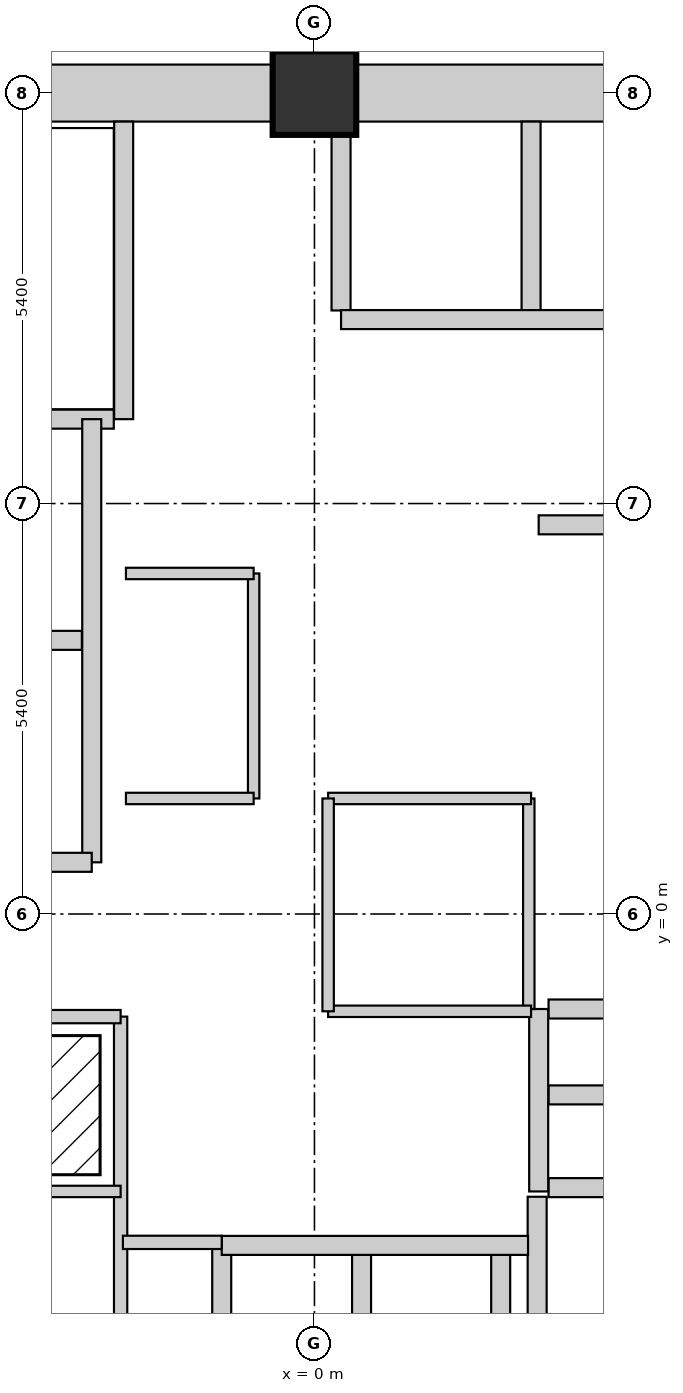
"""IFC4 building model, lengths in metres.
Left out: names, types, materials, properties, quantities, classifications, styles, units other than length and angle.
Written with IfcOpenShell. Run it as: python <this file> out.ifc"""

import sys

from ifc_helpers import new_model, si_unit, direction, frame, frame_2d, origin, origin_2d, place, context, subcontext, project, spatial, rectangle, extrude, element, fill, save


model = new_model("IFC4")
c1 = context("Model", 3, precision=1e-05, world=origin(), true_north=direction((0.0, 1.0)))
c2 = subcontext(c1, "Body", "Model", "MODEL_VIEW")
j1 = project(units=[si_unit("LENGTHUNIT", "METRE"), si_unit("PLANEANGLEUNIT", "RADIAN")], contexts=[c1])
p1 = place(None, origin())
s1 = spatial("IfcSite", under=j1, at=p1, CompositionType="ELEMENT")
p2 = place(p1, origin())
s2 = spatial("IfcBuilding", under=s1, at=p2, CompositionType="ELEMENT")
p3 = place(p2, frame((0.0, 0.0, 83.25)))
s3 = spatial("IfcBuildingStorey", under=s2, at=p3, CompositionType="ELEMENT", Elevation=83.25)
p4 = place(p3, frame((0.0, 10.8, 0.0), z_axis=(0.0, 0.0, 1.0), x_axis=(1.0, 0.0, 0.0)))
e1 = element("IfcColumn", 1, at=p4, inside=s3, PredefinedType="COLUMN", context=c2, shape_type="SweptSolid", body=[
    extrude(rectangle(XDim=1.1, YDim=1.1, at=origin_2d()), origin(), (0.0, 0.0, 1.0), 3.75),
])
p5 = place(p3, frame((-4.84, 10.8, 0.0), z_axis=(0.0, 0.0, 1.0), x_axis=(1.0, 0.0, 0.0)))
e2 = element("IfcWall", 2, at=p5, inside=s3, PredefinedType="SHEAR", context=c2, shape_type="SweptSolid", body=[
    extrude(rectangle(XDim=4.28, YDim=0.75, at=frame_2d((2.14, 0.0))), origin(), (0.0, 0.0, 1.0), 3.75),
])
p6 = place(p5, frame((2.93, 0.0, 0.0)))
e3 = element("IfcOpeningElement", 3, at=p6, cuts=e2, PredefinedType="OPENING", context=c2, shape_type="SweptSolid", body=[
    extrude(rectangle(XDim=1.1, YDim=2.1, at=frame_2d((0.55, 1.05))), frame((0.0, 0.385, 0.0), z_axis=(0.0, -1.0, 0.0), x_axis=(1.0, 0.0, 0.0)), (0.0, 0.0, 1.0), 0.77),
])
p7 = place(p3, frame((0.56, 10.8, 0.0), z_axis=(0.0, 0.0, 1.0), x_axis=(1.0, 0.0, 0.0)))
e4 = element("IfcWall", 4, at=p7, inside=s3, PredefinedType="SHEAR", context=c2, shape_type="SweptSolid", body=[
    extrude(rectangle(XDim=4.28, YDim=0.75, at=frame_2d((2.14, 0.0))), origin(), (0.0, 0.0, 1.0), 3.75),
])
p8 = place(p3, frame((2.93, -6.51, 0.0), z_axis=(0.0, 0.0, 1.0), x_axis=(0.0, 1.0, 0.0)))
e5 = element("IfcWall", 5, at=p8, inside=s3, PredefinedType="SHEAR", context=c2, shape_type="SweptSolid", body=[
    extrude(rectangle(XDim=2.79, YDim=0.25, at=frame_2d((1.395, 0.0))), origin(), (0.0, 0.0, 1.0), 3.75),
])
p9 = place(p3, frame((3.08, -3.6, 0.0), z_axis=(0.0, 0.0, 1.0), x_axis=(1.0, 0.0, 0.0)))
e6 = element("IfcWall", 6, at=p9, inside=s3, PredefinedType="SHEAR", context=c2, shape_type="SweptSolid", body=[
    extrude(rectangle(XDim=2.37, YDim=0.25, at=frame_2d((1.185, 0.0))), origin(), (0.0, 0.0, 1.0), 3.75),
])
for number, where, z_axis, x_axis in (
    (7, (0.62, -6.34, 0.0), (0.0, 0.0, 1.0), (0.0, 1.0, 0.0)),
    (8, (2.45, -6.34, 0.0), (0.0, 0.0, 1.0), (0.0, 1.0, 0.0)),
):
    element("IfcWall", number, at=place(p3, frame(where, z_axis=z_axis, x_axis=x_axis)), inside=s3, PredefinedType="SHEAR", context=c2, shape_type="SweptSolid", body=[
        extrude(rectangle(XDim=1.88, YDim=0.25, at=frame_2d((0.94, 0.0))), origin(), (0.0, 0.0, 1.0), 3.75),
    ])
p10 = place(p3, frame((-1.22, -6.44, 0.0), z_axis=(0.0, 0.0, 1.0), x_axis=(0.0, 1.0, 0.0)))
e9 = element("IfcWall", 9, at=p10, inside=s3, PredefinedType="SHEAR", context=c2, shape_type="SweptSolid", body=[
    extrude(rectangle(XDim=2.08, YDim=0.25, at=frame_2d((1.04, 0.0))), origin(), (0.0, 0.0, 1.0), 3.75),
])
p11 = place(p3, frame((-1.22, -4.36, 0.0), z_axis=(0.0, 0.0, 1.0), x_axis=(1.0, 0.0, 0.0)))
e10 = element("IfcWall", 10, at=p11, inside=s3, PredefinedType="SHEAR", context=c2, shape_type="SweptSolid", body=[
    extrude(rectangle(XDim=4.03, YDim=0.25, at=frame_2d((2.015, 0.0))), origin(), (0.0, 0.0, 1.0), 3.75),
])
p12 = place(p3, frame((2.85, 7.94, 0.0), z_axis=(0.0, 0.0, 1.0), x_axis=(0.0, 1.0, 0.0)))
e11 = element("IfcWall", 11, at=p12, inside=s3, PredefinedType="SHEAR", context=c2, shape_type="SweptSolid", body=[
    extrude(rectangle(XDim=2.485, YDim=0.25, at=frame_2d((1.243, 0.0))), origin(), (0.0, 0.0, 1.0), 3.75),
])
p13 = place(p3, frame((0.35, 7.94, 0.0), z_axis=(0.0, 0.0, 1.0), x_axis=(0.0, 1.0, 0.0)))
e12 = element("IfcWall", 12, at=p13, inside=s3, PredefinedType="SHEAR", context=c2, shape_type="SweptSolid", body=[
    extrude(rectangle(XDim=2.31, YDim=0.25, at=frame_2d((1.155, 0.0))), origin(), (0.0, 0.0, 1.0), 3.75),
])
p14 = place(p3, frame((0.35, 7.82, 0.0), z_axis=(0.0, 0.0, 1.0), x_axis=(1.0, 0.0, 0.0)))
e13 = element("IfcWall", 13, at=p14, inside=s3, PredefinedType="SHEAR", context=c2, shape_type="SweptSolid", body=[
    extrude(rectangle(XDim=10.075, YDim=0.25, at=frame_2d((5.038, 0.0))), origin(), (0.0, 0.0, 1.0), 3.75),
])
p15 = place(p14, frame((0.7, 0.0, 0.0)))
e14 = element("IfcOpeningElement", 14, at=p15, cuts=e13, PredefinedType="OPENING", context=c2, shape_type="SweptSolid", body=[
    extrude(rectangle(XDim=1.1, YDim=2.1, at=frame_2d((0.55, 1.05))), frame((0.0, 0.135, 0.0), z_axis=(0.0, -1.0, 0.0), x_axis=(1.0, 0.0, 0.0)), (0.0, 0.0, 1.0), 0.27),
])
p16 = place(p14, frame((3.2, 0.0, 0.0)))
e15 = element("IfcOpeningElement", 15, at=p16, cuts=e13, PredefinedType="OPENING", context=c2, shape_type="SweptSolid", body=[
    extrude(rectangle(XDim=1.1, YDim=2.1, at=frame_2d((0.55, 1.05))), frame((0.0, 0.135, 0.0), z_axis=(0.0, -1.0, 0.0), x_axis=(1.0, 0.0, 0.0)), (0.0, 0.0, 1.0), 0.27),
])
p17 = place(p14, frame((5.7, 0.0, 0.0)))
e16 = element("IfcOpeningElement", 16, at=p17, cuts=e13, PredefinedType="OPENING", context=c2, shape_type="SweptSolid", body=[
    extrude(rectangle(XDim=1.1, YDim=2.1, at=frame_2d((0.55, 1.05))), frame((0.0, 0.135, 0.0), z_axis=(0.0, -1.0, 0.0), x_axis=(1.0, 0.0, 0.0)), (0.0, 0.0, 1.0), 0.27),
])
p18 = place(p14, frame((8.2, 0.0, 0.0)))
e17 = element("IfcOpeningElement", 17, at=p18, cuts=e13, PredefinedType="OPENING", context=c2, shape_type="SweptSolid", body=[
    extrude(rectangle(XDim=1.1, YDim=2.1, at=frame_2d((0.55, 1.05))), frame((0.0, 0.135, 0.0), z_axis=(0.0, -1.0, 0.0), x_axis=(1.0, 0.0, 0.0)), (0.0, 0.0, 1.0), 0.27),
])
p19 = place(p3, frame((2.95, 5.12, 0.0), z_axis=(0.0, 0.0, 1.0), x_axis=(1.0, 0.0, 0.0)))
e18 = element("IfcWall", 18, at=p19, inside=s3, PredefinedType="SHEAR", context=c2, shape_type="SweptSolid", body=[
    extrude(rectangle(XDim=7.3, YDim=0.25, at=frame_2d((3.65, 0.0))), origin(), (0.0, 0.0, 1.0), 3.75),
])
for number, where, z_axis, x_axis in (
    (19, (3.08, -2.38, 0.0), (0.0, 0.0, 1.0), (1.0, 0.0, 0.0)),
    (20, (3.08, -1.25, 0.0), (0.0, 0.0, 1.0), (1.0, 0.0, 0.0)),
):
    element("IfcWall", number, at=place(p3, frame(where, z_axis=z_axis, x_axis=x_axis)), inside=s3, PredefinedType="SHEAR", context=c2, shape_type="SweptSolid", body=[
        extrude(rectangle(XDim=2.37, YDim=0.25, at=frame_2d((1.185, 0.0))), origin(), (0.0, 0.0, 1.0), 3.75),
    ])
p20 = place(p3, frame((2.95, -3.65, 0.0), z_axis=(0.0, 0.0, 1.0), x_axis=(0.0, 1.0, 0.0)))
e21 = element("IfcWall", 21, at=p20, inside=s3, PredefinedType="SHEAR", context=c2, shape_type="SweptSolid", body=[
    extrude(rectangle(XDim=2.4, YDim=0.25, at=frame_2d((1.2, 0.0))), origin(), (0.0, 0.0, 1.0), 3.75),
])
p21 = place(p20, frame((0.775, 0.0, 0.0)))
e22 = element("IfcOpeningElement", 22, at=p21, cuts=e21, PredefinedType="OPENING", context=c2, shape_type="SweptSolid", body=[
    extrude(rectangle(XDim=0.85, YDim=2.1, at=frame_2d((0.425, 1.05))), frame((0.0, 0.135, 0.0), z_axis=(0.0, -1.0, 0.0), x_axis=(1.0, 0.0, 0.0)), (0.0, 0.0, 1.0), 0.27),
])
p22 = place(p3, frame((-2.51, 6.51, 0.0), z_axis=(0.0, 0.0, 1.0), x_axis=(0.0, 1.0, 0.0)))
e23 = element("IfcWall", 23, at=p22, inside=s3, PredefinedType="SHEAR", context=c2, shape_type="SweptSolid", body=[
    extrude(rectangle(XDim=3.915, YDim=0.25, at=frame_2d((1.958, 0.0))), origin(), (0.0, 0.0, 1.0), 3.75),
])
p23 = place(p3, frame((-10.34, 6.51, 0.0), z_axis=(0.0, 0.0, 1.0), x_axis=(1.0, 0.0, 0.0)))
e24 = element("IfcWall", 24, at=p23, inside=s3, PredefinedType="SHEAR", context=c2, shape_type="SweptSolid", body=[
    extrude(rectangle(XDim=7.7, YDim=0.25, at=frame_2d((3.85, 0.0))), origin(), (0.0, 0.0, 1.0), 3.75),
])
p24 = place(p23, frame((0.35, 0.0, 0.0)))
e25 = element("IfcOpeningElement", 25, at=p24, cuts=e24, PredefinedType="OPENING", context=c2, shape_type="SweptSolid", body=[
    extrude(rectangle(XDim=1.1, YDim=2.1, at=frame_2d((0.55, 1.05))), frame((0.0, 0.135, 0.0), z_axis=(0.0, -1.0, 0.0), x_axis=(1.0, 0.0, 0.0)), (0.0, 0.0, 1.0), 0.27),
])
p25 = place(p3, frame((-2.93, 0.68, 0.0), z_axis=(0.0, 0.0, 1.0), x_axis=(0.0, 1.0, 0.0)))
e26 = element("IfcWall", 26, at=p25, inside=s3, PredefinedType="SHEAR", context=c2, shape_type="SweptSolid", body=[
    extrude(rectangle(XDim=5.83, YDim=0.25, at=frame_2d((2.915, 0.0))), origin(), (0.0, 0.0, 1.0), 3.75),
])
p26 = place(p25, frame((0.75, 0.0, 0.0)))
e27 = element("IfcOpeningElement", 27, at=p26, cuts=e26, PredefinedType="OPENING", context=c2, shape_type="SweptSolid", body=[
    extrude(rectangle(XDim=1.2, YDim=2.1, at=frame_2d((0.6, 1.05))), frame((0.0, 0.135, 0.0), z_axis=(0.0, -1.0, 0.0), x_axis=(1.0, 0.0, 0.0)), (0.0, 0.0, 1.0), 0.27),
])
p27 = place(p3, frame((-5.45, 3.6, 0.0), z_axis=(0.0, 0.0, 1.0), x_axis=(1.0, 0.0, 0.0)))
e28 = element("IfcWall", 28, at=p27, inside=s3, PredefinedType="SHEAR", context=c2, shape_type="SweptSolid", body=[
    extrude(rectangle(XDim=2.39, YDim=0.25, at=frame_2d((1.195, 0.0))), origin(), (0.0, 0.0, 1.0), 3.75),
])
p28 = place(p3, frame((-5.58, 0.68, 0.0), z_axis=(0.0, 0.0, 1.0), x_axis=(1.0, 0.0, 0.0)))
e29 = element("IfcWall", 29, at=p28, inside=s3, PredefinedType="SHEAR", context=c2, shape_type="SweptSolid", body=[
    extrude(rectangle(XDim=2.65, YDim=0.25, at=frame_2d((1.325, 0.0))), origin(), (0.0, 0.0, 1.0), 3.75),
])
p29 = place(p3, frame((2.82, -1.25, 0.0), z_axis=(0.0, 0.0, 1.0), x_axis=(0.0, 1.0, 0.0)))
e30 = element("IfcWall", 30, at=p29, inside=s3, PredefinedType="PARTITIONING", context=c2, shape_type="SweptSolid", body=[
    extrude(rectangle(XDim=2.77, YDim=0.15, at=frame_2d((1.385, 0.0))), origin(), (0.0, 0.0, 1.0), 3.57),
])
for number, where, z_axis, x_axis in (
    (31, (0.18, 1.52, 0.0), (0.0, 0.0, 1.0), (1.0, 0.0, 0.0)),
    (32, (0.18, -1.28, 0.0), (0.0, 0.0, 1.0), (1.0, 0.0, 0.0)),
):
    element("IfcWall", number, at=place(p3, frame(where, z_axis=z_axis, x_axis=x_axis)), inside=s3, PredefinedType="PARTITIONING", context=c2, shape_type="SweptSolid", body=[
        extrude(rectangle(XDim=2.67, YDim=0.15, at=frame_2d((1.335, 0.0))), origin(), (0.0, 0.0, 1.0), 3.57),
    ])
p30 = place(p3, frame((0.18, -1.28, 0.0), z_axis=(0.0, 0.0, 1.0), x_axis=(0.0, 1.0, 0.0)))
e33 = element("IfcWall", 33, at=p30, inside=s3, PredefinedType="PARTITIONING", context=c2, shape_type="SweptSolid", body=[
    extrude(rectangle(XDim=2.8, YDim=0.15, at=frame_2d((1.4, 0.0))), origin(), (0.0, 0.0, 1.0), 3.57),
])
p31 = place(p30, frame((0.85, 0.0, 0.0)))
e34 = element("IfcOpeningElement", 34, at=p31, cuts=e33, PredefinedType="OPENING", context=c2, shape_type="SweptSolid", body=[
    extrude(rectangle(XDim=0.85, YDim=2.1, at=frame_2d((0.425, 1.05))), frame((0.0, 0.085, 0.0), z_axis=(0.0, -1.0, 0.0), x_axis=(1.0, 0.0, 0.0)), (0.0, 0.0, 1.0), 0.17),
])
p32 = place(p3, frame((-2.55, -6.51, 0.0), z_axis=(0.0, 0.0, 1.0), x_axis=(0.0, 1.0, 0.0)))
e35 = element("IfcWall", 35, at=p32, inside=s3, PredefinedType="PARTITIONING", context=c2, shape_type="SweptSolid", body=[
    extrude(rectangle(XDim=5.16, YDim=0.175, at=frame_2d((2.58, 0.0))), origin(), (0.0, 0.0, 1.0), 3.57),
])
p33 = place(p32, frame((3.45, 0.0, 0.0)))
e36 = element("IfcOpeningElement", 36, at=p33, cuts=e35, PredefinedType="OPENING", context=c2, shape_type="SweptSolid", body=[
    extrude(rectangle(XDim=0.85, YDim=2.1, at=frame_2d((0.425, 1.05))), frame((0.0, 0.097, 0.0), z_axis=(0.0, -1.0, 0.0), x_axis=(1.0, 0.0, 0.0)), (0.0, 0.0, 1.0), 0.195),
])
p34 = place(p3, frame((-7.18, -3.65, 0.0), z_axis=(0.0, 0.0, 1.0), x_axis=(1.0, 0.0, 0.0)))
e37 = element("IfcWall", 37, at=p34, inside=s3, PredefinedType="PARTITIONING", context=c2, shape_type="SweptSolid", body=[
    extrude(rectangle(XDim=4.63, YDim=0.15, at=frame_2d((2.315, 0.0))), origin(), (0.0, 0.0, 1.0), 3.57),
])
p35 = place(p34, frame((1.0, 0.0, 0.0)))
e38 = element("IfcOpeningElement", 38, at=p35, cuts=e37, PredefinedType="OPENING", context=c2, shape_type="SweptSolid", body=[
    extrude(rectangle(XDim=0.85, YDim=2.1, at=frame_2d((0.425, 1.05))), frame((0.0, 0.085, 0.0), z_axis=(0.0, -1.0, 0.0), x_axis=(1.0, 0.0, 0.0)), (0.0, 0.0, 1.0), 0.17),
])
p36 = place(p3, frame((-7.18, -1.35, 0.0), z_axis=(0.0, 0.0, 1.0), x_axis=(1.0, 0.0, 0.0)))
e39 = element("IfcWall", 39, at=p36, inside=s3, PredefinedType="PARTITIONING", context=c2, shape_type="SweptSolid", body=[
    extrude(rectangle(XDim=4.63, YDim=0.175, at=frame_2d((2.315, 0.0))), origin(), (0.0, 0.0, 1.0), 3.57),
])
p37 = place(p3, frame((-2.52, -4.32, 0.0), z_axis=(0.0, 0.0, 1.0), x_axis=(1.0, 0.0, 0.0)))
e40 = element("IfcWall", 40, at=p37, inside=s3, PredefinedType="PARTITIONING", context=c2, shape_type="SweptSolid", body=[
    extrude(rectangle(XDim=1.3, YDim=0.175, at=frame_2d((0.65, 0.0))), origin(), (0.0, 0.0, 1.0), 3.57),
])
p38 = place(p37, frame((0.22, 0.0, 0.0)))
e41 = element("IfcOpeningElement", 41, at=p38, cuts=e40, PredefinedType="OPENING", context=c2, shape_type="SweptSolid", body=[
    extrude(rectangle(XDim=0.85, YDim=2.1, at=frame_2d((0.425, 1.05))), frame((0.0, 0.097, 0.0), z_axis=(0.0, -1.0, 0.0), x_axis=(1.0, 0.0, 0.0)), (0.0, 0.0, 1.0), 0.195),
])
p39 = place(p3, frame((-0.8, 1.52, 0.0), z_axis=(0.0, 0.0, 1.0), x_axis=(0.0, 1.0, 0.0)))
e42 = element("IfcWall", 42, at=p39, inside=s3, PredefinedType="PARTITIONING", context=c2, shape_type="SweptSolid", body=[
    extrude(rectangle(XDim=2.96, YDim=0.15, at=frame_2d((1.48, 0.0))), origin(), (0.0, 0.0, 1.0), 3.57),
])
p40 = place(p39, frame((0.95, 0.0, 0.0)))
e43 = element("IfcOpeningElement", 43, at=p40, cuts=e42, PredefinedType="OPENING", context=c2, shape_type="SweptSolid", body=[
    extrude(rectangle(XDim=0.85, YDim=2.1, at=frame_2d((0.425, 1.05))), frame((0.0, 0.085, 0.0), z_axis=(0.0, -1.0, 0.0), x_axis=(1.0, 0.0, 0.0)), (0.0, 0.0, 1.0), 0.17),
])
for number, where, z_axis, x_axis in (
    (44, (-2.48, 4.48, 0.0), (0.0, 0.0, 1.0), (1.0, 0.0, 0.0)),
    (45, (-2.48, 1.52, 0.0), (0.0, 0.0, 1.0), (1.0, 0.0, 0.0)),
):
    element("IfcWall", number, at=place(p3, frame(where, z_axis=z_axis, x_axis=x_axis)), inside=s3, PredefinedType="PARTITIONING", context=c2, shape_type="SweptSolid", body=[
        extrude(rectangle(XDim=1.68, YDim=0.15, at=frame_2d((0.84, 0.0))), origin(), (0.0, 0.0, 1.0), 3.57),
    ])
p41 = place(p31, origin())
e46 = element("IfcDoor", 46, at=p41, inside=s3, OperationType="SINGLE_SWING_RIGHT", PredefinedType="DOOR", context=c2, shape_type="SweptSolid", body=[
    extrude(rectangle(XDim=0.85, YDim=2.1, at=frame_2d((0.425, 1.05))), frame((0.0, 0.025, 0.0), z_axis=(0.0, -1.0, 0.0), x_axis=(1.0, 0.0, 0.0)), (0.0, 0.0, 1.0), 0.05),
])
fill(e34, e46)
p42 = place(p40, origin())
e47 = element("IfcDoor", 47, at=p42, inside=s3, OperationType="SINGLE_SWING_LEFT", PredefinedType="DOOR", context=c2, shape_type="SweptSolid", body=[
    extrude(rectangle(XDim=0.85, YDim=2.1, at=frame_2d((0.425, 1.05))), frame((0.0, 0.025, 0.0), z_axis=(0.0, -1.0, 0.0), x_axis=(1.0, 0.0, 0.0)), (0.0, 0.0, 1.0), 0.05),
])
fill(e43, e47)
p43 = place(p21, origin())
e48 = element("IfcDoor", 48, at=p43, inside=s3, OperationType="SINGLE_SWING_LEFT", PredefinedType="DOOR", context=c2, shape_type="SweptSolid", body=[
    extrude(rectangle(XDim=0.85, YDim=2.1, at=frame_2d((0.425, 1.05))), frame((0.0, 0.025, 0.0), z_axis=(0.0, -1.0, 0.0), x_axis=(1.0, 0.0, 0.0)), (0.0, 0.0, 1.0), 0.05),
])
fill(e22, e48)
p44 = place(p6, origin())
e49 = element("IfcDoor", 49, at=p44, inside=s3, OperationType="SINGLE_SWING_LEFT", PredefinedType="DOOR", context=c2, shape_type="SweptSolid", body=[
    extrude(rectangle(XDim=1.1, YDim=2.1, at=frame_2d((0.55, 1.05))), frame((0.0, 0.025, 0.0), z_axis=(0.0, -1.0, 0.0), x_axis=(1.0, 0.0, 0.0)), (0.0, 0.0, 1.0), 0.05),
])
fill(e3, e49)
p45 = place(p26, origin())
e50 = element("IfcDoor", 50, at=p45, inside=s3, OperationType="SLIDING_TO_LEFT", PredefinedType="DOOR", context=c2, shape_type="SweptSolid", body=[
    extrude(rectangle(XDim=1.2, YDim=2.1, at=frame_2d((0.6, 1.05))), frame((0.0, 0.025, 0.0), z_axis=(0.0, -1.0, 0.0), x_axis=(1.0, 0.0, 0.0)), (0.0, 0.0, 1.0), 0.05),
])
fill(e27, e50)
p46 = place(p15, origin())
e51 = element("IfcDoor", 51, at=p46, inside=s3, OperationType="SLIDING_TO_LEFT", PredefinedType="DOOR", context=c2, shape_type="SweptSolid", body=[
    extrude(rectangle(XDim=1.1, YDim=2.1, at=frame_2d((0.55, 1.05))), frame((0.0, 0.025, 0.0), z_axis=(0.0, -1.0, 0.0), x_axis=(1.0, 0.0, 0.0)), (0.0, 0.0, 1.0), 0.05),
])
fill(e14, e51)
p47 = place(p16, origin())
e52 = element("IfcDoor", 52, at=p47, inside=s3, OperationType="SLIDING_TO_LEFT", PredefinedType="DOOR", context=c2, shape_type="SweptSolid", body=[
    extrude(rectangle(XDim=1.1, YDim=2.1, at=frame_2d((0.55, 1.05))), frame((0.0, 0.025, 0.0), z_axis=(0.0, -1.0, 0.0), x_axis=(1.0, 0.0, 0.0)), (0.0, 0.0, 1.0), 0.05),
])
fill(e15, e52)
p48 = place(p38, origin())
e53 = element("IfcDoor", 53, at=p48, inside=s3, OperationType="SINGLE_SWING_LEFT", PredefinedType="DOOR", context=c2, shape_type="SweptSolid", body=[
    extrude(rectangle(XDim=0.85, YDim=2.1, at=frame_2d((0.425, 1.05))), frame((0.0, 0.025, 0.0), z_axis=(0.0, -1.0, 0.0), x_axis=(1.0, 0.0, 0.0)), (0.0, 0.0, 1.0), 0.05),
])
fill(e41, e53)
p49 = place(p33, origin())
e54 = element("IfcDoor", 54, at=p49, inside=s3, OperationType="SINGLE_SWING_LEFT", PredefinedType="DOOR", context=c2, shape_type="SweptSolid", body=[
    extrude(rectangle(XDim=0.85, YDim=2.1, at=frame_2d((0.425, 1.05))), frame((0.0, 0.025, 0.0), z_axis=(0.0, -1.0, 0.0), x_axis=(1.0, 0.0, 0.0)), (0.0, 0.0, 1.0), 0.05),
])
fill(e36, e54)
save(model, sys.argv[1])
